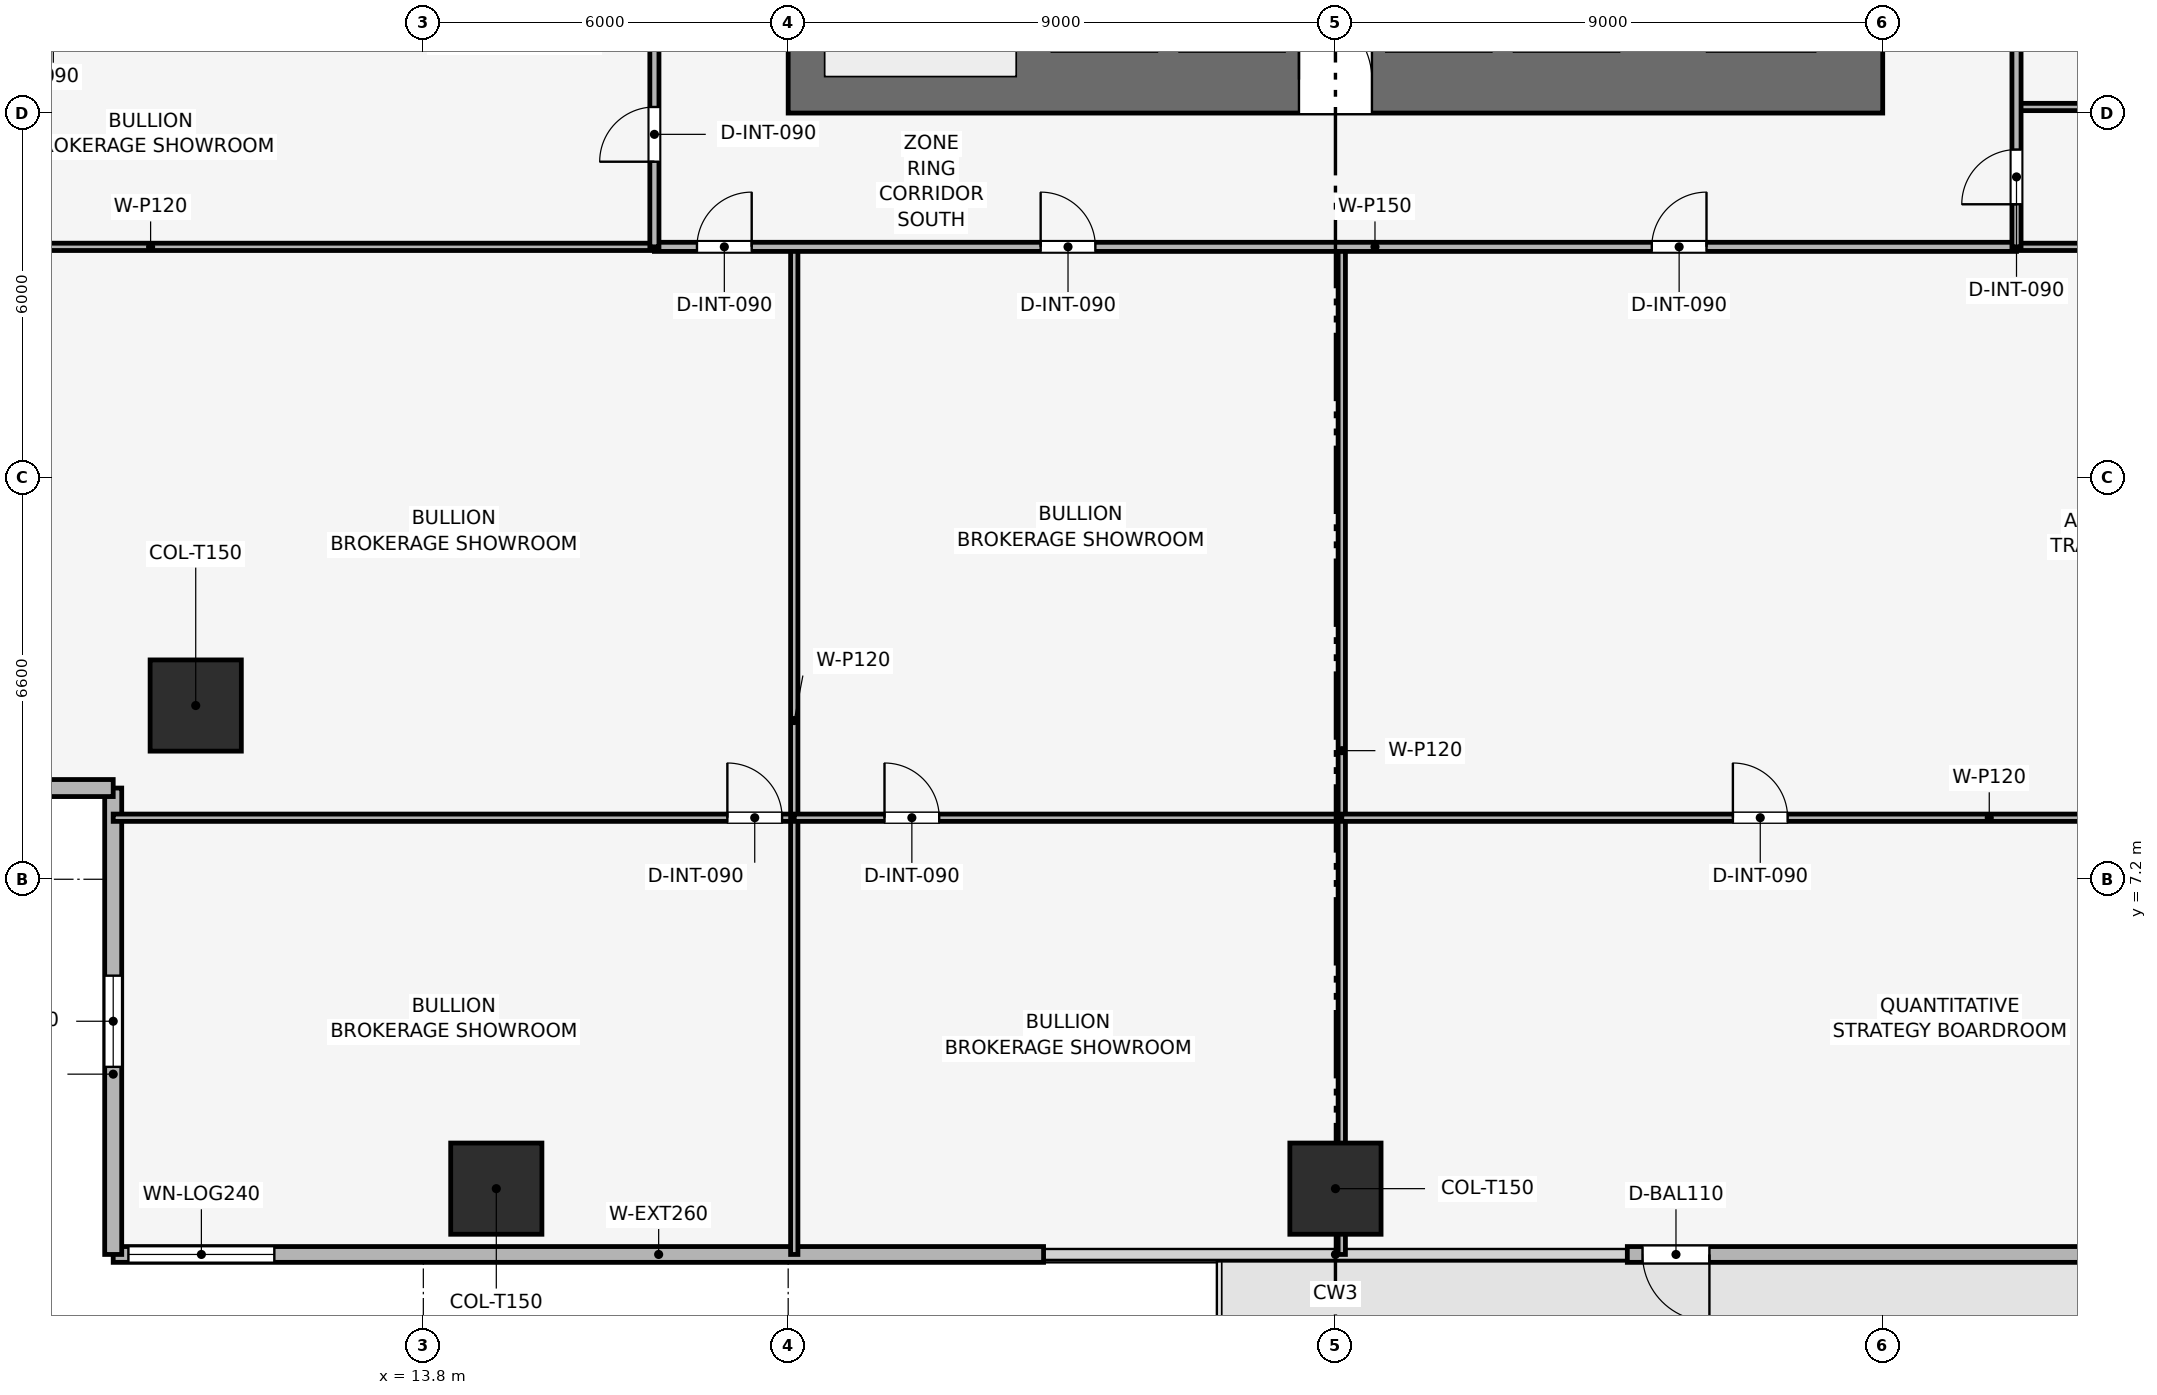
"""IFC4 building model, lengths in metres.
Left out: names, types, materials, properties, quantities, classifications, styles, units other than length and angle.
Written with IfcOpenShell. Run it as: python <this file> out.ifc"""

import sys

from ifc_helpers import new_model, si_unit, direction, frame, frame_2d, origin, origin_2d, place, context, subcontext, project, spatial, rectangle, extrude, element, fill, save


model = new_model("IFC4")
c1 = context("Model", 3, precision=1e-05, world=origin(), true_north=direction((0.0, 1.0)))
c2 = subcontext(c1, "Body", "Model", "MODEL_VIEW")
j1 = project(units=[si_unit("LENGTHUNIT", "METRE"), si_unit("PLANEANGLEUNIT", "RADIAN")], contexts=[c1])
p1 = place(None, origin())
s1 = spatial("IfcSite", under=j1, at=p1, CompositionType="ELEMENT")
p2 = place(p1, origin())
s2 = spatial("IfcBuilding", under=s1, at=p2, CompositionType="ELEMENT")
p3 = place(p2, frame((0.0, 0.0, 104.1)))
s3 = spatial("IfcBuildingStorey", under=s2, at=p3, CompositionType="ELEMENT", Elevation=104.1)
p4 = place(p3, frame((19.8, 20.35, 0.0), z_axis=(0.0, 0.0, 1.0), x_axis=(1.0, 0.0, 0.0)))
e1 = element("IfcWall", 1, at=p4, inside=s3, PredefinedType="SHEAR", context=c2, shape_type="SweptSolid", body=[
    extrude(rectangle(XDim=18.0, YDim=1.1, at=frame_2d((9.0, 0.0))), origin(), (0.0, 0.0, 1.0), 3.9),
])
p5 = place(p4, frame((8.4, 0.0, 0.0)))
e2 = element("IfcOpeningElement", 2, at=p5, cuts=e1, PredefinedType="OPENING", context=c2, shape_type="SweptSolid", body=[
    extrude(rectangle(XDim=1.2, YDim=2.2, at=frame_2d((0.6, 1.1))), frame((0.0, 0.56, 0.0), z_axis=(0.0, -1.0, 0.0), x_axis=(1.0, 0.0, 0.0)), (0.0, 0.0, 1.0), 1.12),
])
for number, where, z_axis, x_axis in (
    (3, (15.0, 2.112, 0.053), (0.0, 0.225, 0.974), (-1.0, 0.0, 0.0)),
    (4, (28.8, 2.112, 0.053), (0.0, 0.225, 0.974), (-1.0, 0.0, 0.0)),
):
    element("IfcColumn", number, at=place(p3, frame(where, z_axis=z_axis, x_axis=x_axis)), inside=s3, PredefinedType="COLUMN", context=c2, shape_type="SweptSolid", body=[
        extrude(rectangle(XDim=1.5, YDim=1.5, at=origin_2d()), origin(), (0.0, 0.0, 1.0), 3.575),
    ])
p6 = place(p3, frame((10.057, 10.057, 0.044), z_axis=(0.150258975924, 0.150258975924, 0.977161440248), x_axis=(-0.707106781187, 0.707106781187, 0.0)))
e5 = element("IfcColumn", 5, at=p6, inside=s3, PredefinedType="COLUMN", context=c2, shape_type="SweptSolid", body=[
    extrude(rectangle(XDim=1.5, YDim=1.5, at=origin_2d()), origin(), (0.0, 0.0, 1.0), 3.574),
])
p7 = place(p3, frame((48.9, 1.03, 0.0), z_axis=(0.0, 0.0, 1.0), x_axis=(-1.0, 0.0, 0.0)))
e6 = element("IfcWall", 6, at=p7, inside=s3, PredefinedType="SOLIDWALL", context=c2, shape_type="SweptSolid", body=[
    extrude(rectangle(XDim=15.3, YDim=0.26, at=frame_2d((7.65, 0.0))), origin(), (0.0, 0.0, 1.0), 3.54),
])
p8 = place(p7, frame((13.95, 0.0, 0.0)))
e7 = element("IfcOpeningElement", 7, at=p8, cuts=e6, PredefinedType="OPENING", context=c2, shape_type="SweptSolid", body=[
    extrude(rectangle(XDim=1.1, YDim=2.2, at=frame_2d((0.55, 1.1))), frame((0.0, 0.14, 0.0), z_axis=(0.0, -1.0, 0.0), x_axis=(1.0, 0.0, 0.0)), (0.0, 0.0, 1.0), 0.28),
])
p9 = place(p3, frame((24.0, 1.03, 0.0), z_axis=(0.0, 0.0, 1.0), x_axis=(-1.0, 0.0, 0.0)))
e8 = element("IfcWall", 8, at=p9, inside=s3, PredefinedType="SOLIDWALL", context=c2, shape_type="SweptSolid", body=[
    extrude(rectangle(XDim=15.3, YDim=0.26, at=frame_2d((7.65, 0.0))), origin(), (0.0, 0.0, 1.0), 3.54),
])
p10 = place(p9, frame((12.65, 0.0, 0.72)))
e9 = element("IfcOpeningElement", 9, at=p10, cuts=e8, PredefinedType="OPENING", context=c2, shape_type="SweptSolid", body=[
    extrude(rectangle(XDim=2.4, YDim=2.1, at=frame_2d((1.2, 1.05))), frame((0.0, 0.14, 0.0), z_axis=(0.0, -1.0, 0.0), x_axis=(1.0, 0.0, 0.0)), (0.0, 0.0, 1.0), 0.28),
])
p11 = place(p3, frame((8.7, 1.03, 0.0), z_axis=(0.0, 0.0, 1.0), x_axis=(0.0, 1.0, 0.0)))
e10 = element("IfcWall", 10, at=p11, inside=s3, PredefinedType="SOLIDWALL", context=c2, shape_type="SweptSolid", body=[
    extrude(rectangle(XDim=7.67, YDim=0.28, at=frame_2d((3.835, 0.0))), origin(), (0.0, 0.0, 1.0), 3.54),
])
p12 = place(p11, frame((3.085, 0.0, 0.72)))
e11 = element("IfcOpeningElement", 11, at=p12, cuts=e10, PredefinedType="OPENING", context=c2, shape_type="SweptSolid", body=[
    extrude(rectangle(XDim=1.5, YDim=2.2, at=frame_2d((0.75, 1.1))), frame((0.0, 0.15, 0.0), z_axis=(0.0, -1.0, 0.0), x_axis=(1.0, 0.0, 0.0)), (0.0, 0.0, 1.0), 0.3),
])
p13 = place(p3, frame((8.7, 8.7, 0.0), z_axis=(0.0, 0.0, 1.0), x_axis=(-1.0, 0.0, 0.0)))
e12 = element("IfcWall", 12, at=p13, inside=s3, PredefinedType="SOLIDWALL", context=c2, shape_type="SweptSolid", body=[
    extrude(rectangle(XDim=7.67, YDim=0.28, at=frame_2d((3.835, 0.0))), origin(), (0.0, 0.0, 1.0), 3.54),
])
p14 = place(p13, frame((3.085, 0.0, 0.72)))
e13 = element("IfcOpeningElement", 13, at=p14, cuts=e12, PredefinedType="OPENING", context=c2, shape_type="SweptSolid", body=[
    extrude(rectangle(XDim=1.5, YDim=2.2, at=frame_2d((0.75, 1.1))), frame((0.0, 0.15, 0.0), z_axis=(0.0, -1.0, 0.0), x_axis=(1.0, 0.0, 0.0)), (0.0, 0.0, 1.0), 0.3),
])
p15 = place(p3, frame((8.7, 8.212, 0.0), z_axis=(0.0, 0.0, 1.0), x_axis=(1.0, 0.0, 0.0)))
e14 = element("IfcWall", 14, at=p15, inside=s3, PredefinedType="PARTITIONING", context=c2, shape_type="SweptSolid", body=[
    extrude(rectangle(XDim=11.2, YDim=0.12, at=frame_2d((5.6, 0.0))), origin(), (0.0, 0.0, 1.0), 2.825),
])
p16 = place(p15, frame((10.1, 0.0, 0.0)))
e15 = element("IfcOpeningElement", 15, at=p16, cuts=e14, PredefinedType="OPENING", context=c2, shape_type="SweptSolid", body=[
    extrude(rectangle(XDim=0.9, YDim=2.1, at=frame_2d((0.45, 1.05))), frame((0.0, 0.07, 0.0), z_axis=(0.0, -1.0, 0.0), x_axis=(1.0, 0.0, 0.0)), (0.0, 0.0, 1.0), 0.14),
])
p17 = place(p3, frame((19.9, 1.03, 0.0), z_axis=(0.0, 0.0, 1.0), x_axis=(0.0, 1.0, 0.0)))
e16 = element("IfcWall", 16, at=p17, inside=s3, PredefinedType="PARTITIONING", context=c2, shape_type="SweptSolid", body=[
    extrude(rectangle(XDim=16.57, YDim=0.12, at=frame_2d((8.285, 0.0))), origin(), (0.0, 0.0, 1.0), 2.825),
])
p18 = place(p3, frame((19.9, 8.212, 0.0), z_axis=(0.0, 0.0, 1.0), x_axis=(1.0, 0.0, 0.0)))
e17 = element("IfcWall", 17, at=p18, inside=s3, PredefinedType="PARTITIONING", context=c2, shape_type="SweptSolid", body=[
    extrude(rectangle(XDim=9.004, YDim=0.12, at=frame_2d((4.502, 0.0))), origin(), (0.0, 0.0, 1.0), 2.975),
])
p19 = place(p18, frame((1.484, 0.0, 0.0)))
e18 = element("IfcOpeningElement", 18, at=p19, cuts=e17, PredefinedType="OPENING", context=c2, shape_type="SweptSolid", body=[
    extrude(rectangle(XDim=0.9, YDim=2.1, at=frame_2d((0.45, 1.05))), frame((0.0, 0.07, 0.0), z_axis=(0.0, -1.0, 0.0), x_axis=(1.0, 0.0, 0.0)), (0.0, 0.0, 1.0), 0.14),
])
p20 = place(p3, frame((28.904, 1.03, 0.0), z_axis=(0.0, 0.0, 1.0), x_axis=(0.0, 1.0, 0.0)))
e19 = element("IfcWall", 19, at=p20, inside=s3, PredefinedType="PARTITIONING", context=c2, shape_type="SweptSolid", body=[
    extrude(rectangle(XDim=16.57, YDim=0.12, at=frame_2d((8.285, 0.0))), origin(), (0.0, 0.0, 1.0), 2.975),
])
p21 = place(p3, frame((28.904, 8.212, 0.0), z_axis=(0.0, 0.0, 1.0), x_axis=(1.0, 0.0, 0.0)))
e20 = element("IfcWall", 20, at=p21, inside=s3, PredefinedType="PARTITIONING", context=c2, shape_type="SweptSolid", body=[
    extrude(rectangle(XDim=19.996, YDim=0.12, at=frame_2d((9.998, 0.0))), origin(), (0.0, 0.0, 1.0), 2.825),
])
p22 = place(p21, frame((6.432, 0.0, 0.0)))
e21 = element("IfcOpeningElement", 21, at=p22, cuts=e20, PredefinedType="OPENING", context=c2, shape_type="SweptSolid", body=[
    extrude(rectangle(XDim=0.9, YDim=2.1, at=frame_2d((0.45, 1.05))), frame((0.0, 0.07, 0.0), z_axis=(0.0, -1.0, 0.0), x_axis=(1.0, 0.0, 0.0)), (0.0, 0.0, 1.0), 0.14),
])
for number, where, z_axis, x_axis in (
    (22, (1.03, 17.6, 0.0), (0.0, 0.0, 1.0), (1.0, 0.0, 0.0)),
    (23, (40.0, 17.6, 0.0), (0.0, 0.0, 1.0), (1.0, 0.0, 0.0)),
    (24, (40.0, 19.9, 0.0), (0.0, 0.0, 1.0), (1.0, 0.0, 0.0)),
):
    element("IfcWall", number, at=place(p3, frame(where, z_axis=z_axis, x_axis=x_axis)), inside=s3, PredefinedType="PARTITIONING", context=c2, shape_type="SweptSolid", body=[
        extrude(rectangle(XDim=16.57, YDim=0.12, at=frame_2d((8.285, 0.0))), origin(), (0.0, 0.0, 1.0), 2.825),
    ])
p23 = place(p3, frame((17.6, 17.6, 0.0), z_axis=(0.0, 0.0, 1.0), x_axis=(1.0, 0.0, 0.0)))
e25 = element("IfcWall", 25, at=p23, inside=s3, PredefinedType="PARTITIONING", context=c2, shape_type="SweptSolid", body=[
    extrude(rectangle(XDim=22.4, YDim=0.15, at=frame_2d((11.2, 0.0))), origin(), (0.0, 0.0, 1.0), 2.975),
])
p24 = place(p23, frame((0.7, 0.0, 0.0)))
e26 = element("IfcOpeningElement", 26, at=p24, cuts=e25, PredefinedType="OPENING", context=c2, shape_type="SweptSolid", body=[
    extrude(rectangle(XDim=0.9, YDim=2.1, at=frame_2d((0.45, 1.05))), frame((0.0, 0.085, 0.0), z_axis=(0.0, -1.0, 0.0), x_axis=(1.0, 0.0, 0.0)), (0.0, 0.0, 1.0), 0.17),
])
p25 = place(p23, frame((6.352, 0.0, 0.0)))
e27 = element("IfcOpeningElement", 27, at=p25, cuts=e25, PredefinedType="OPENING", context=c2, shape_type="SweptSolid", body=[
    extrude(rectangle(XDim=0.9, YDim=2.1, at=frame_2d((0.45, 1.05))), frame((0.0, 0.085, 0.0), z_axis=(0.0, -1.0, 0.0), x_axis=(1.0, 0.0, 0.0)), (0.0, 0.0, 1.0), 0.17),
])
p26 = place(p23, frame((16.402, 0.0, 0.0)))
e28 = element("IfcOpeningElement", 28, at=p26, cuts=e25, PredefinedType="OPENING", context=c2, shape_type="SweptSolid", body=[
    extrude(rectangle(XDim=0.9, YDim=2.1, at=frame_2d((0.45, 1.05))), frame((0.0, 0.085, 0.0), z_axis=(0.0, -1.0, 0.0), x_axis=(1.0, 0.0, 0.0)), (0.0, 0.0, 1.0), 0.17),
])
p27 = place(p3, frame((17.6, 17.6, 0.0), z_axis=(0.0, 0.0, 1.0), x_axis=(0.0, 1.0, 0.0)))
e29 = element("IfcWall", 29, at=p27, inside=s3, PredefinedType="PARTITIONING", context=c2, shape_type="SweptSolid", body=[
    extrude(rectangle(XDim=22.4, YDim=0.15, at=frame_2d((11.2, 0.0))), origin(), (0.0, 0.0, 1.0), 2.975),
])
p28 = place(p27, frame((1.4, 0.0, 0.0)))
e30 = element("IfcOpeningElement", 30, at=p28, cuts=e29, PredefinedType="OPENING", context=c2, shape_type="SweptSolid", body=[
    extrude(rectangle(XDim=0.9, YDim=2.1, at=frame_2d((0.45, 1.05))), frame((0.0, 0.085, 0.0), z_axis=(0.0, -1.0, 0.0), x_axis=(1.0, 0.0, 0.0)), (0.0, 0.0, 1.0), 0.17),
])
p29 = place(p27, frame((4.65, 0.0, 0.0)))
e31 = element("IfcOpeningElement", 31, at=p29, cuts=e29, PredefinedType="OPENING", context=c2, shape_type="SweptSolid", body=[
    extrude(rectangle(XDim=0.9, YDim=2.1, at=frame_2d((0.45, 1.05))), frame((0.0, 0.085, 0.0), z_axis=(0.0, -1.0, 0.0), x_axis=(1.0, 0.0, 0.0)), (0.0, 0.0, 1.0), 0.17),
])
p30 = place(p27, frame((7.55, 0.0, 0.0)))
e32 = element("IfcOpeningElement", 32, at=p30, cuts=e29, PredefinedType="OPENING", context=c2, shape_type="SweptSolid", body=[
    extrude(rectangle(XDim=0.9, YDim=2.1, at=frame_2d((0.45, 1.05))), frame((0.0, 0.085, 0.0), z_axis=(0.0, -1.0, 0.0), x_axis=(1.0, 0.0, 0.0)), (0.0, 0.0, 1.0), 0.17),
])
p31 = place(p27, frame((10.3, 0.0, 0.0)))
e33 = element("IfcOpeningElement", 33, at=p31, cuts=e29, PredefinedType="OPENING", context=c2, shape_type="SweptSolid", body=[
    extrude(rectangle(XDim=0.95, YDim=2.1, at=frame_2d((0.475, 1.05))), frame((0.0, 0.085, 0.0), z_axis=(0.0, -1.0, 0.0), x_axis=(1.0, 0.0, 0.0)), (0.0, 0.0, 1.0), 0.17),
])
p32 = place(p27, frame((16.8, 0.0, 0.0)))
e34 = element("IfcOpeningElement", 34, at=p32, cuts=e29, PredefinedType="OPENING", context=c2, shape_type="SweptSolid", body=[
    extrude(rectangle(XDim=0.9, YDim=2.1, at=frame_2d((0.45, 1.05))), frame((0.0, 0.085, 0.0), z_axis=(0.0, -1.0, 0.0), x_axis=(1.0, 0.0, 0.0)), (0.0, 0.0, 1.0), 0.17),
])
p33 = place(p3, frame((40.0, 17.6, 0.0), z_axis=(0.0, 0.0, 1.0), x_axis=(0.0, 1.0, 0.0)))
e35 = element("IfcWall", 35, at=p33, inside=s3, PredefinedType="PARTITIONING", context=c2, shape_type="SweptSolid", body=[
    extrude(rectangle(XDim=22.4, YDim=0.15, at=frame_2d((11.2, 0.0))), origin(), (0.0, 0.0, 1.0), 2.975),
])
p34 = place(p33, frame((0.7, 0.0, 0.0)))
e36 = element("IfcOpeningElement", 36, at=p34, cuts=e35, PredefinedType="OPENING", context=c2, shape_type="SweptSolid", body=[
    extrude(rectangle(XDim=0.9, YDim=2.1, at=frame_2d((0.45, 1.05))), frame((0.0, 0.085, 0.0), z_axis=(0.0, -1.0, 0.0), x_axis=(1.0, 0.0, 0.0)), (0.0, 0.0, 1.0), 0.17),
])
p35 = place(p33, frame((4.927, 0.0, 0.0)))
e37 = element("IfcOpeningElement", 37, at=p35, cuts=e35, PredefinedType="OPENING", context=c2, shape_type="SweptSolid", body=[
    extrude(rectangle(XDim=0.9, YDim=2.1, at=frame_2d((0.45, 1.05))), frame((0.0, 0.085, 0.0), z_axis=(0.0, -1.0, 0.0), x_axis=(1.0, 0.0, 0.0)), (0.0, 0.0, 1.0), 0.17),
])
p36 = place(p33, frame((10.886, 0.0, 0.0)))
e38 = element("IfcOpeningElement", 38, at=p36, cuts=e35, PredefinedType="OPENING", context=c2, shape_type="SweptSolid", body=[
    extrude(rectangle(XDim=0.9, YDim=2.1, at=frame_2d((0.45, 1.05))), frame((0.0, 0.085, 0.0), z_axis=(0.0, -1.0, 0.0), x_axis=(1.0, 0.0, 0.0)), (0.0, 0.0, 1.0), 0.17),
])
p37 = place(p33, frame((17.859, 0.0, 0.0)))
e39 = element("IfcOpeningElement", 39, at=p37, cuts=e35, PredefinedType="OPENING", context=c2, shape_type="SweptSolid", body=[
    extrude(rectangle(XDim=0.9, YDim=2.1, at=frame_2d((0.45, 1.05))), frame((0.0, 0.085, 0.0), z_axis=(0.0, -1.0, 0.0), x_axis=(1.0, 0.0, 0.0)), (0.0, 0.0, 1.0), 0.17),
])
p38 = place(p8, origin())
e40 = element("IfcDoor", 40, at=p38, inside=s3, OperationType="SINGLE_SWING_LEFT", PredefinedType="DOOR", context=c2, shape_type="SweptSolid", body=[
    extrude(rectangle(XDim=1.1, YDim=2.2, at=frame_2d((0.55, 1.1))), frame((0.0, 0.025, 0.0), z_axis=(0.0, -1.0, 0.0), x_axis=(1.0, 0.0, 0.0)), (0.0, 0.0, 1.0), 0.05),
])
fill(e7, e40)
p39 = place(p10, origin())
e41 = element("IfcWindow", 41, at=p39, inside=s3, PartitioningType="SINGLE_PANEL", PredefinedType="WINDOW", context=c2, shape_type="SweptSolid", body=[
    extrude(rectangle(XDim=2.4, YDim=2.1, at=frame_2d((1.2, 1.05))), frame((0.0, 0.03, 0.0), z_axis=(0.0, -1.0, 0.0), x_axis=(1.0, 0.0, 0.0)), (0.0, 0.0, 1.0), 0.06),
])
fill(e9, e41)
p40 = place(p12, origin())
e42 = element("IfcWindow", 42, at=p40, inside=s3, PartitioningType="SINGLE_PANEL", PredefinedType="WINDOW", context=c2, shape_type="SweptSolid", body=[
    extrude(rectangle(XDim=1.5, YDim=2.2, at=frame_2d((0.75, 1.1))), frame((0.0, 0.03, 0.0), z_axis=(0.0, -1.0, 0.0), x_axis=(1.0, 0.0, 0.0)), (0.0, 0.0, 1.0), 0.06),
])
fill(e11, e42)
p41 = place(p16, origin())
e43 = element("IfcDoor", 43, at=p41, inside=s3, OperationType="SINGLE_SWING_LEFT", PredefinedType="DOOR", context=c2, shape_type="SweptSolid", body=[
    extrude(rectangle(XDim=0.9, YDim=2.1, at=frame_2d((0.45, 1.05))), frame((0.0, 0.025, 0.0), z_axis=(0.0, -1.0, 0.0), x_axis=(1.0, 0.0, 0.0)), (0.0, 0.0, 1.0), 0.05),
])
fill(e15, e43)
p42 = place(p19, origin())
e44 = element("IfcDoor", 44, at=p42, inside=s3, OperationType="SINGLE_SWING_LEFT", PredefinedType="DOOR", context=c2, shape_type="SweptSolid", body=[
    extrude(rectangle(XDim=0.9, YDim=2.1, at=frame_2d((0.45, 1.05))), frame((0.0, 0.025, 0.0), z_axis=(0.0, -1.0, 0.0), x_axis=(1.0, 0.0, 0.0)), (0.0, 0.0, 1.0), 0.05),
])
fill(e18, e44)
p43 = place(p22, origin())
e45 = element("IfcDoor", 45, at=p43, inside=s3, OperationType="SINGLE_SWING_LEFT", PredefinedType="DOOR", context=c2, shape_type="SweptSolid", body=[
    extrude(rectangle(XDim=0.9, YDim=2.1, at=frame_2d((0.45, 1.05))), frame((0.0, 0.025, 0.0), z_axis=(0.0, -1.0, 0.0), x_axis=(1.0, 0.0, 0.0)), (0.0, 0.0, 1.0), 0.05),
])
fill(e21, e45)
p44 = place(p24, origin())
e46 = element("IfcDoor", 46, at=p44, inside=s3, OperationType="SINGLE_SWING_RIGHT", PredefinedType="DOOR", context=c2, shape_type="SweptSolid", body=[
    extrude(rectangle(XDim=0.9, YDim=2.1, at=frame_2d((0.45, 1.05))), frame((0.0, 0.025, 0.0), z_axis=(0.0, -1.0, 0.0), x_axis=(1.0, 0.0, 0.0)), (0.0, 0.0, 1.0), 0.05),
])
fill(e26, e46)
p45 = place(p25, origin())
e47 = element("IfcDoor", 47, at=p45, inside=s3, OperationType="SINGLE_SWING_LEFT", PredefinedType="DOOR", context=c2, shape_type="SweptSolid", body=[
    extrude(rectangle(XDim=0.9, YDim=2.1, at=frame_2d((0.45, 1.05))), frame((0.0, 0.025, 0.0), z_axis=(0.0, -1.0, 0.0), x_axis=(1.0, 0.0, 0.0)), (0.0, 0.0, 1.0), 0.05),
])
fill(e27, e47)
p46 = place(p26, origin())
e48 = element("IfcDoor", 48, at=p46, inside=s3, OperationType="SINGLE_SWING_RIGHT", PredefinedType="DOOR", context=c2, shape_type="SweptSolid", body=[
    extrude(rectangle(XDim=0.9, YDim=2.1, at=frame_2d((0.45, 1.05))), frame((0.0, 0.025, 0.0), z_axis=(0.0, -1.0, 0.0), x_axis=(1.0, 0.0, 0.0)), (0.0, 0.0, 1.0), 0.05),
])
fill(e28, e48)
p47 = place(p28, origin())
e49 = element("IfcDoor", 49, at=p47, inside=s3, OperationType="SINGLE_SWING_LEFT", PredefinedType="DOOR", context=c2, shape_type="SweptSolid", body=[
    extrude(rectangle(XDim=0.9, YDim=2.1, at=frame_2d((0.45, 1.05))), frame((0.0, 0.025, 0.0), z_axis=(0.0, -1.0, 0.0), x_axis=(1.0, 0.0, 0.0)), (0.0, 0.0, 1.0), 0.05),
])
fill(e30, e49)
p48 = place(p34, origin())
e50 = element("IfcDoor", 50, at=p48, inside=s3, OperationType="SINGLE_SWING_LEFT", PredefinedType="DOOR", context=c2, shape_type="SweptSolid", body=[
    extrude(rectangle(XDim=0.9, YDim=2.1, at=frame_2d((0.45, 1.05))), frame((0.0, 0.025, 0.0), z_axis=(0.0, -1.0, 0.0), x_axis=(1.0, 0.0, 0.0)), (0.0, 0.0, 1.0), 0.05),
])
fill(e36, e50)
p49 = place(p5, origin())
e51 = element("IfcDoor", 51, at=p49, inside=s3, OperationType="SINGLE_SWING_LEFT", PredefinedType="DOOR", context=c2, shape_type="SweptSolid", body=[
    extrude(rectangle(XDim=1.2, YDim=2.2, at=frame_2d((0.6, 1.1))), frame((0.0, 0.025, 0.0), z_axis=(0.0, -1.0, 0.0), x_axis=(1.0, 0.0, 0.0)), (0.0, 0.0, 1.0), 0.05),
])
fill(e2, e51)
save(model, sys.argv[1])
